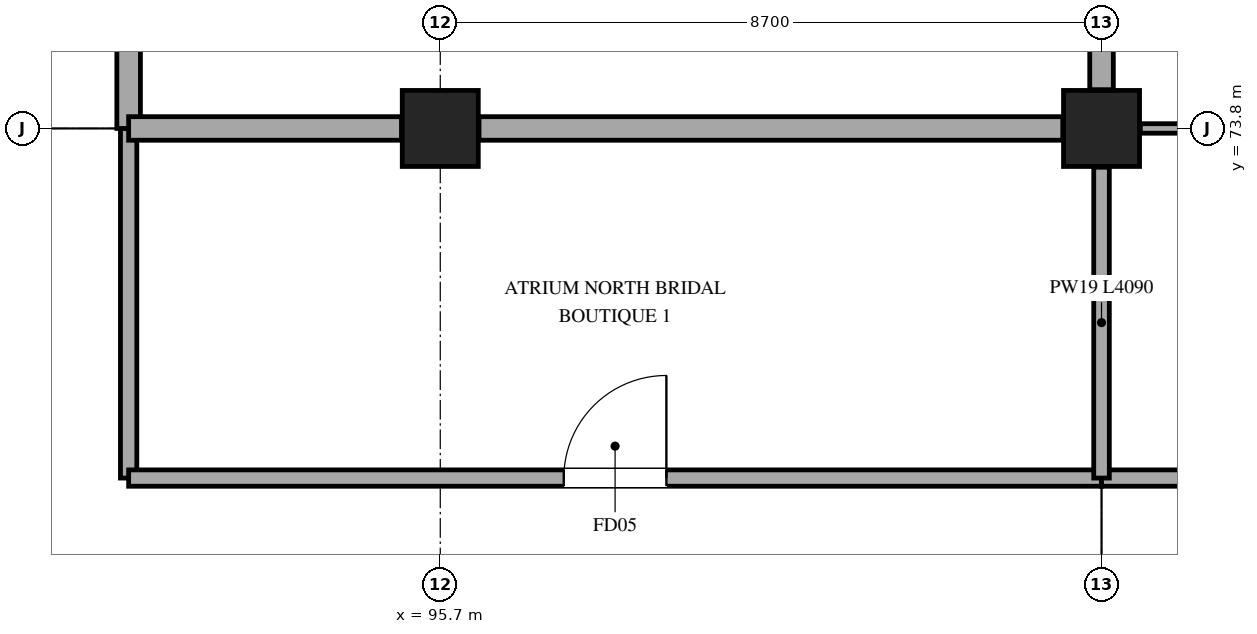
"""IFC4 building model, lengths in metres.
Left out: names, types, materials, properties, quantities, classifications, styles, units other than length and angle.
Written with IfcOpenShell. Run it as: python <this file> out.ifc"""

import sys

from ifc_helpers import new_model, si_unit, direction, frame, frame_2d, origin, origin_2d, place, context, subcontext, project, spatial, rectangle, extrude, element, fill, save


model = new_model("IFC4")
c1 = context("Model", 3, precision=1e-05, world=origin(), true_north=direction((0.0, 1.0)))
c2 = subcontext(c1, "Body", "Model", "MODEL_VIEW")
j1 = project(units=[si_unit("LENGTHUNIT", "METRE"), si_unit("PLANEANGLEUNIT", "RADIAN")], contexts=[c1])
p1 = place(None, origin())
s1 = spatial("IfcSite", under=j1, at=p1, CompositionType="ELEMENT")
p2 = place(p1, origin())
s2 = spatial("IfcBuilding", under=s1, at=p2, CompositionType="ELEMENT")
p3 = place(p2, frame((0.0, 0.0, 6.0)))
s3 = spatial("IfcBuildingStorey", under=s2, at=p3, CompositionType="ELEMENT", Elevation=6.0)
for number, where, z_axis, x_axis in (
    (1, (95.7, 73.8, 0.0), (0.0, 0.0, 1.0), (1.0, 0.0, 0.0)),
    (2, (104.4, 73.8, 0.0), (0.0, 0.0, 1.0), (1.0, 0.0, 0.0)),
):
    element("IfcColumn", number, at=place(p3, frame(where, z_axis=z_axis, x_axis=x_axis)), inside=s3, PredefinedType="COLUMN", context=c2, shape_type="SweptSolid", body=[
        extrude(rectangle(XDim=1.0, YDim=1.0, at=origin_2d()), origin(), (0.0, 0.0, 1.0), 5.4),
    ])
p4 = place(p3, frame((91.6, 73.8, 0.0), z_axis=(0.0, 0.0, 1.0), x_axis=(0.0, -1.0, 0.0)))
e3 = element("IfcWall", 3, at=p4, inside=s3, PredefinedType="PARTITIONING", context=c2, shape_type="SweptSolid", body=[
    extrude(rectangle(XDim=4.6, YDim=0.215, at=frame_2d((2.3, 0.0))), origin(), (0.0, 0.0, 1.0), 4.31),
])
p5 = place(p3, frame((91.6, 69.2, 0.0), z_axis=(0.0, 0.0, 1.0), x_axis=(1.0, 0.0, 0.0)))
e4 = element("IfcWall", 4, at=p5, inside=s3, PredefinedType="PARTITIONING", context=c2, shape_type="SweptSolid", body=[
    extrude(rectangle(XDim=12.8, YDim=0.215, at=frame_2d((6.4, 0.0))), origin(), (0.0, 0.0, 1.0), 4.31),
])
p6 = place(p5, frame((5.725, 0.0, 0.0)))
e5 = element("IfcOpeningElement", 5, at=p6, cuts=e4, PredefinedType="OPENING", context=c2, shape_type="SweptSolid", body=[
    extrude(rectangle(XDim=1.35, YDim=2.2, at=frame_2d((0.675, 1.1))), frame((0.0, 0.118, 0.0), z_axis=(0.0, -1.0, 0.0), x_axis=(1.0, 0.0, 0.0)), (0.0, 0.0, 1.0), 0.235),
])
p7 = place(p3, frame((91.6, 94.8, 0.0), z_axis=(0.0, 0.0, 1.0), x_axis=(0.0, -1.0, 0.0)))
e6 = element("IfcWall", 6, at=p7, inside=s3, PredefinedType="STANDARD", context=c2, shape_type="SweptSolid", body=[
    extrude(rectangle(XDim=21.0, YDim=0.31, at=frame_2d((10.5, 0.0))), origin(), (0.0, 0.0, 1.0), 4.28),
])
p8 = place(p7, frame((9.575, 0.0, 0.0)))
e7 = element("IfcOpeningElement", 7, at=p8, cuts=e6, PredefinedType="OPENING", context=c2, shape_type="SweptSolid", body=[
    extrude(rectangle(XDim=1.85, YDim=2.3, at=frame_2d((0.925, 1.15))), frame((0.0, 0.165, 0.0), z_axis=(0.0, -1.0, 0.0), x_axis=(1.0, 0.0, 0.0)), (0.0, 0.0, 1.0), 0.33),
])
p9 = place(p3, frame((104.4, 69.2, 0.0), z_axis=(0.0, 0.0, 1.0), x_axis=(1.0, 0.0, 0.0)))
e8 = element("IfcWall", 8, at=p9, inside=s3, PredefinedType="PARTITIONING", context=c2, shape_type="SweptSolid", body=[
    extrude(rectangle(XDim=12.8, YDim=0.215, at=frame_2d((6.4, 0.0))), origin(), (0.0, 0.0, 1.0), 4.31),
])
p10 = place(p9, frame((5.725, 0.0, 0.0)))
e9 = element("IfcOpeningElement", 9, at=p10, cuts=e8, PredefinedType="OPENING", context=c2, shape_type="SweptSolid", body=[
    extrude(rectangle(XDim=1.35, YDim=2.2, at=frame_2d((0.675, 1.1))), frame((0.0, 0.118, 0.0), z_axis=(0.0, -1.0, 0.0), x_axis=(1.0, 0.0, 0.0)), (0.0, 0.0, 1.0), 0.235),
])
p11 = place(p3, frame((91.6, 73.8, 0.0), z_axis=(0.0, 0.0, 1.0), x_axis=(1.0, 0.0, 0.0)))
e10 = element("IfcWall", 10, at=p11, inside=s3, PredefinedType="STANDARD", context=c2, shape_type="SweptSolid", body=[
    extrude(rectangle(XDim=3.59, YDim=0.31, at=frame_2d((1.795, 0.0))), origin(), (0.0, 0.0, 1.0), 4.31),
])
p12 = place(p3, frame((96.21, 73.8, 0.0), z_axis=(0.0, 0.0, 1.0), x_axis=(1.0, 0.0, 0.0)))
e11 = element("IfcWall", 11, at=p12, inside=s3, PredefinedType="STANDARD", context=c2, shape_type="SweptSolid", body=[
    extrude(rectangle(XDim=7.68, YDim=0.31, at=frame_2d((3.84, 0.0))), origin(), (0.0, 0.0, 1.0), 4.31),
])
p13 = place(p3, frame((104.4, 73.29, 0.0), z_axis=(0.0, 0.0, 1.0), x_axis=(0.0, -1.0, 0.0)))
e12 = element("IfcWall", 12, at=p13, inside=s3, PredefinedType="PARTITIONING", context=c2, shape_type="SweptSolid", body=[
    extrude(rectangle(XDim=4.09, YDim=0.205, at=frame_2d((2.045, 0.0))), origin(), (0.0, 0.0, 1.0), 4.31),
])
p14 = place(p3, frame((104.4, 81.69, 0.0), z_axis=(0.0, 0.0, 1.0), x_axis=(0.0, -1.0, 0.0)))
e13 = element("IfcWall", 13, at=p14, inside=s3, PredefinedType="STANDARD", context=c2, shape_type="SweptSolid", body=[
    extrude(rectangle(XDim=7.38, YDim=0.31, at=frame_2d((3.69, 0.0))), origin(), (0.0, 0.0, 1.0), 4.28),
])
p15 = place(p3, frame((112.59, 73.8, 0.0), z_axis=(0.0, 0.0, 1.0), x_axis=(-1.0, 0.0, 0.0)))
e14 = element("IfcWall", 14, at=p15, inside=s3, PredefinedType="PARTITIONING", context=c2, shape_type="SweptSolid", body=[
    extrude(rectangle(XDim=7.68, YDim=0.125, at=frame_2d((3.84, 0.0))), origin(), (0.0, 0.0, 1.0), 4.31),
])
p16 = place(p6, origin())
e15 = element("IfcDoor", 15, at=p16, inside=s3, OperationType="SINGLE_SWING_RIGHT", PredefinedType="DOOR", context=c2, shape_type="SweptSolid", body=[
    extrude(rectangle(XDim=1.35, YDim=2.2, at=frame_2d((0.675, 1.1))), frame((0.0, 0.025, 0.0), z_axis=(0.0, -1.0, 0.0), x_axis=(1.0, 0.0, 0.0)), (0.0, 0.0, 1.0), 0.05),
])
fill(e5, e15)
save(model, sys.argv[1])
